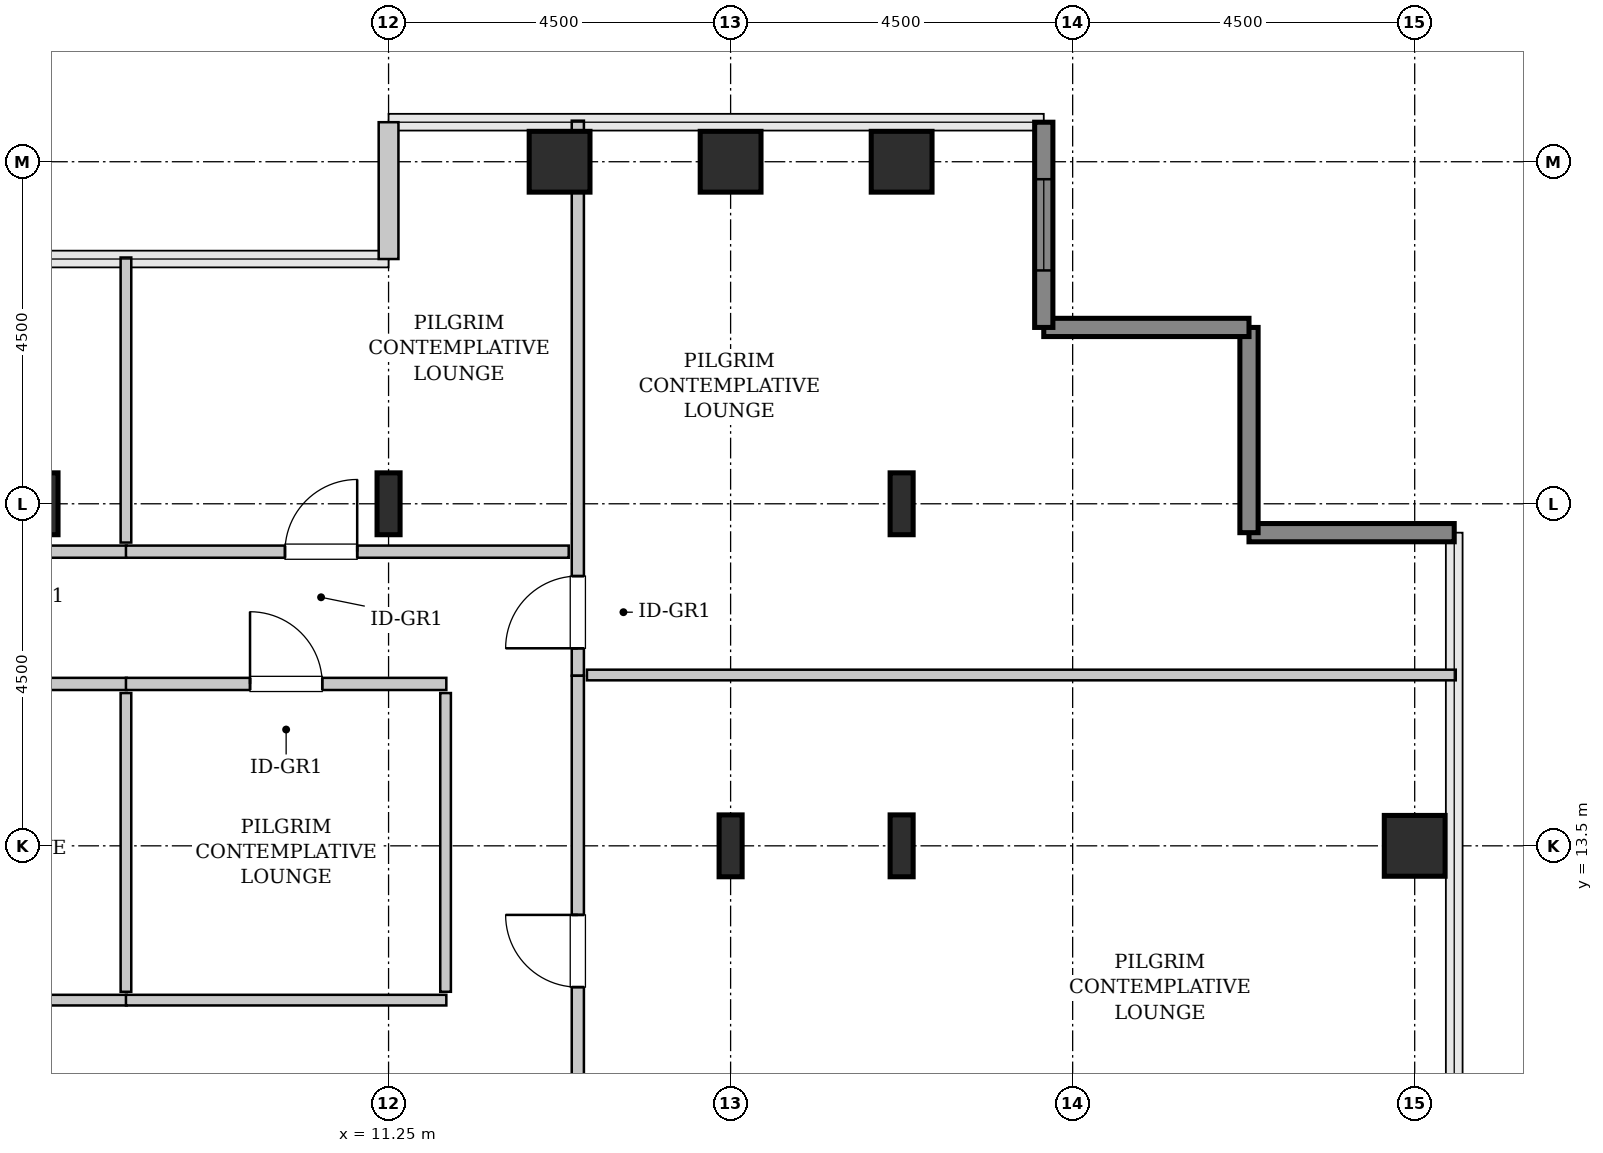
"""IFC4 building model, lengths in metres.
Left out: names, types, materials, properties, quantities, classifications, styles, units other than length and angle.
Written with IfcOpenShell. Run it as: python <this file> out.ifc"""

import sys

from ifc_helpers import new_model, si_unit, direction, frame, frame_2d, origin, origin_2d, place, context, subcontext, project, spatial, rectangle, hollow_rectangle, i_section, extrude, source, transform, mapped, element, fill, save


model = new_model("IFC4")
c1 = context("Model", 3, precision=1e-05, world=origin(), true_north=direction((0.0, 1.0)))
c2 = subcontext(c1, "Body", "Model", "MODEL_VIEW")
j1 = project(units=[si_unit("LENGTHUNIT", "METRE"), si_unit("PLANEANGLEUNIT", "RADIAN")], contexts=[c1])
p1 = place(None, origin())
s1 = spatial("IfcSite", under=j1, at=p1, CompositionType="ELEMENT")
p2 = place(p1, origin())
s2 = spatial("IfcBuilding", under=s1, at=p2, CompositionType="ELEMENT")
p3 = place(p2, frame((0.0, 0.0, 175.4)))
s3 = spatial("IfcBuildingStorey", under=s2, at=p3, CompositionType="ELEMENT", Elevation=175.4)
m1 = source(origin(), c2, "Body", "SweptSolid", [
    extrude(i_section(OverallWidth=0.303, OverallDepth=0.814, WebThickness=0.021, FlangeThickness=0.04, FilletRadius=0.03, at=origin_2d()), origin(), (0.0, 0.0, 1.0), 3.8),
])
for number, where, z_axis, x_axis in (
    (1, (6.75, 18.0, 0.0), (0.0, 0.0, 1.0), (1.0, 0.0, 0.0)),
    (2, (11.25, 18.0, 0.0), (0.0, 0.0, 1.0), (1.0, 0.0, 0.0)),
):
    element("IfcColumn", number, at=place(p3, frame(where, z_axis=z_axis, x_axis=x_axis)), inside=s3, PredefinedType="COLUMN", context=c2, shape_type="MappedRepresentation", body=[
        mapped(m1, transform((0.0, 0.0, 0.0), x_axis=(1.0, 0.0, 0.0), y_axis=(0.0, 1.0, 0.0), z_axis=(0.0, 0.0, 1.0), scale=1.0)),
    ])
m2 = source(origin(), c2, "Body", "SweptSolid", [
    extrude(hollow_rectangle(XDim=0.8, YDim=0.8, WallThickness=0.04, InnerFilletRadius=0.04, OuterFilletRadius=0.08, at=origin_2d()), origin(), (0.0, 0.0, 1.0), 3.8),
])
p4 = place(p3, frame((13.5, 22.5, 0.0), z_axis=(0.0, 0.0, 1.0), x_axis=(1.0, 0.0, 0.0)))
e3 = element("IfcColumn", 3, at=p4, inside=s3, PredefinedType="COLUMN", context=c2, shape_type="MappedRepresentation", body=[
    mapped(m2, transform((0.0, 0.0, 0.0), x_axis=(1.0, 0.0, 0.0), y_axis=(0.0, 1.0, 0.0), z_axis=(0.0, 0.0, 1.0), scale=1.0)),
])
p5 = place(p3, frame((15.75, 13.5, 0.0), z_axis=(0.0, 0.0, 1.0), x_axis=(1.0, 0.0, 0.0)))
e4 = element("IfcColumn", 4, at=p5, inside=s3, PredefinedType="COLUMN", context=c2, shape_type="MappedRepresentation", body=[
    mapped(m1, transform((0.0, 0.0, 0.0), x_axis=(1.0, 0.0, 0.0), y_axis=(0.0, 1.0, 0.0), z_axis=(0.0, 0.0, 1.0), scale=1.0)),
])
p6 = place(p3, frame((15.75, 22.5, 0.0), z_axis=(0.0, 0.0, 1.0), x_axis=(1.0, 0.0, 0.0)))
e5 = element("IfcColumn", 5, at=p6, inside=s3, PredefinedType="COLUMN", context=c2, shape_type="MappedRepresentation", body=[
    mapped(m2, transform((0.0, 0.0, 0.0), x_axis=(1.0, 0.0, 0.0), y_axis=(0.0, 1.0, 0.0), z_axis=(0.0, 0.0, 1.0), scale=1.0)),
])
for number, where, z_axis, x_axis in (
    (6, (18.0, 13.5, 0.0), (0.0, 0.0, 1.0), (1.0, 0.0, 0.0)),
    (7, (18.0, 18.0, 0.0), (0.0, 0.0, 1.0), (1.0, 0.0, 0.0)),
):
    element("IfcColumn", number, at=place(p3, frame(where, z_axis=z_axis, x_axis=x_axis)), inside=s3, PredefinedType="COLUMN", context=c2, shape_type="MappedRepresentation", body=[
        mapped(m1, transform((0.0, 0.0, 0.0), x_axis=(1.0, 0.0, 0.0), y_axis=(0.0, 1.0, 0.0), z_axis=(0.0, 0.0, 1.0), scale=1.0)),
    ])
for number, where, z_axis, x_axis in (
    (8, (18.0, 22.5, 0.0), (0.0, 0.0, 1.0), (1.0, 0.0, 0.0)),
    (9, (24.75, 13.5, 0.0), (0.0, 0.0, 1.0), (1.0, 0.0, 0.0)),
):
    element("IfcColumn", number, at=place(p3, frame(where, z_axis=z_axis, x_axis=x_axis)), inside=s3, PredefinedType="COLUMN", context=c2, shape_type="MappedRepresentation", body=[
        mapped(m2, transform((0.0, 0.0, 0.0), x_axis=(1.0, 0.0, 0.0), y_axis=(0.0, 1.0, 0.0), z_axis=(0.0, 0.0, 1.0), scale=1.0)),
    ])
m3 = source(origin(), c2, "Body", "SweptSolid", [
    extrude(rectangle(XDim=2.7, YDim=0.24, at=frame_2d((1.35, 0.0))), origin(), (0.0, 0.0, 1.0), 3.55),
])
for number, where, z_axis, x_axis in (
    (10, (25.27, 17.62, 0.0), (0.0, 0.0, 1.0), (-1.0, 0.0, 0.0)),
    (11, (22.57, 17.62, 0.0), (0.0, 0.0, 1.0), (0.0, 1.0, 0.0)),
    (12, (22.57, 20.32, 0.0), (0.0, 0.0, 1.0), (-1.0, 0.0, 0.0)),
):
    element("IfcWall", number, at=place(p3, frame(where, z_axis=z_axis, x_axis=x_axis)), inside=s3, PredefinedType="SHEAR", context=c2, shape_type="MappedRepresentation", body=[
        mapped(m3, transform((0.0, 0.0, 0.0), x_axis=(1.0, 0.0, 0.0), y_axis=(0.0, 1.0, 0.0), z_axis=(0.0, 0.0, 1.0), scale=1.0)),
    ])
p7 = place(p3, frame((19.87, 20.32, 0.0), z_axis=(0.0, 0.0, 1.0), x_axis=(0.0, 1.0, 0.0)))
e13 = element("IfcWall", 13, at=p7, inside=s3, PredefinedType="SHEAR", context=c2, shape_type="MappedRepresentation", body=[
    mapped(m3, transform((0.0, 0.0, 0.0), x_axis=(1.0, 0.0, 0.0), y_axis=(0.0, 1.0, 0.0), z_axis=(0.0, 0.0, 1.0), scale=1.0)),
])
p8 = place(p7, frame((0.75, 0.0, 0.85)))
e14 = element("IfcOpeningElement", 14, at=p8, cuts=e13, PredefinedType="OPENING", context=c2, shape_type="SweptSolid", body=[
    extrude(rectangle(XDim=1.2, YDim=1.8, at=frame_2d((0.6, 0.9))), frame((0.0, 0.13, 0.0), z_axis=(0.0, -1.0, 0.0), x_axis=(1.0, 0.0, 0.0)), (0.0, 0.0, 1.0), 0.26),
])
m4 = source(origin(), c2, "Body", "SweptSolid", [
    extrude(rectangle(XDim=1.8, YDim=0.26, at=frame_2d((0.9, 0.0))), origin(), (0.0, 0.0, 1.0), 3.55),
])
p9 = place(p3, frame((11.25, 23.02, 0.0), z_axis=(0.0, 0.0, 1.0), x_axis=(0.0, -1.0, 0.0)))
e15 = element("IfcWall", 15, at=p9, inside=s3, PredefinedType="SOLIDWALL", context=c2, shape_type="MappedRepresentation", body=[
    mapped(m4, transform((0.0, 0.0, 0.0), x_axis=(1.0, 0.0, 0.0), y_axis=(0.0, 1.0, 0.0), z_axis=(0.0, 0.0, 1.0), scale=1.0)),
])
m5 = source(origin(), c2, "Body", "SweptSolid", [
    extrude(rectangle(XDim=7.302, YDim=0.16, at=frame_2d((3.651, 0.0))), origin(), (0.0, 0.0, 1.0), 3.535),
])
p10 = place(p3, frame((13.74, 15.738, 0.0), z_axis=(0.0, 0.0, 1.0), x_axis=(0.0, 1.0, 0.0)))
e16 = element("IfcWall", 16, at=p10, inside=s3, PredefinedType="PARTITIONING", context=c2, shape_type="MappedRepresentation", body=[
    mapped(m5, transform((0.0, 0.0, 0.0), x_axis=(1.0, 0.0, 0.0), y_axis=(0.0, 1.0, 0.0), z_axis=(0.0, 0.0, 1.0), scale=1.0)),
])
p11 = place(p10, frame((0.361, 0.0, 0.0)))
e17 = element("IfcOpeningElement", 17, at=p11, cuts=e16, PredefinedType="OPENING", context=c2, shape_type="SweptSolid", body=[
    extrude(rectangle(XDim=0.95, YDim=2.1, at=frame_2d((0.475, 1.05))), frame((0.0, 0.09, 0.0), z_axis=(0.0, -1.0, 0.0), x_axis=(1.0, 0.0, 0.0)), (0.0, 0.0, 1.0), 0.18),
])
m6 = source(origin(), c2, "Body", "SweptSolid", [
    extrude(rectangle(XDim=11.43, YDim=0.14, at=frame_2d((5.715, 0.0))), origin(), (0.0, 0.0, 1.0), 3.535),
])
p12 = place(p3, frame((13.86, 15.748, 0.0), z_axis=(0.0, 0.0, 1.0), x_axis=(1.0, 0.0, 0.0)))
e18 = element("IfcWall", 18, at=p12, inside=s3, PredefinedType="PARTITIONING", context=c2, shape_type="MappedRepresentation", body=[
    mapped(m6, transform((0.0, 0.0, 0.0), x_axis=(1.0, 0.0, 0.0), y_axis=(0.0, 1.0, 0.0), z_axis=(0.0, 0.0, 1.0), scale=1.0)),
])
m7 = source(origin(), c2, "Body", "SweptSolid", [
    extrude(rectangle(XDim=7.242, YDim=0.16, at=frame_2d((3.621, 0.0))), origin(), (0.0, 0.0, 1.0), 3.535),
])
p13 = place(p3, frame((13.74, 8.495, 0.0), z_axis=(0.0, 0.0, 1.0), x_axis=(0.0, 1.0, 0.0)))
e19 = element("IfcWall", 19, at=p13, inside=s3, PredefinedType="PARTITIONING", context=c2, shape_type="MappedRepresentation", body=[
    mapped(m7, transform((0.0, 0.0, 0.0), x_axis=(1.0, 0.0, 0.0), y_axis=(0.0, 1.0, 0.0), z_axis=(0.0, 0.0, 1.0), scale=1.0)),
])
p14 = place(p13, frame((3.146, 0.0, 0.0)))
e20 = element("IfcOpeningElement", 20, at=p14, cuts=e19, PredefinedType="OPENING", context=c2, shape_type="SweptSolid", body=[
    extrude(rectangle(XDim=0.95, YDim=2.1, at=frame_2d((0.475, 1.05))), frame((0.0, 0.09, 0.0), z_axis=(0.0, -1.0, 0.0), x_axis=(1.0, 0.0, 0.0)), (0.0, 0.0, 1.0), 0.18),
])
m8 = source(origin(), c2, "Body", "SweptSolid", [
    extrude(rectangle(XDim=6.01, YDim=0.16, at=frame_2d((3.005, 0.0))), origin(), (0.0, 0.0, 1.0), 3.535),
])
p15 = place(p3, frame((1.795, 17.37, 0.0), z_axis=(0.0, 0.0, 1.0), x_axis=(1.0, 0.0, 0.0)))
e21 = element("IfcWall", 21, at=p15, inside=s3, PredefinedType="PARTITIONING", context=c2, shape_type="MappedRepresentation", body=[
    mapped(m8, transform((0.0, 0.0, 0.0), x_axis=(1.0, 0.0, 0.0), y_axis=(0.0, 1.0, 0.0), z_axis=(0.0, 0.0, 1.0), scale=1.0)),
])
p16 = place(p15, frame((2.53, 0.0, 0.0)))
e22 = element("IfcOpeningElement", 22, at=p16, cuts=e21, PredefinedType="OPENING", context=c2, shape_type="SweptSolid", body=[
    extrude(rectangle(XDim=0.95, YDim=2.1, at=frame_2d((0.475, 1.05))), frame((0.0, 0.09, 0.0), z_axis=(0.0, -1.0, 0.0), x_axis=(1.0, 0.0, 0.0)), (0.0, 0.0, 1.0), 0.18),
])
m9 = source(origin(), c2, "Body", "SweptSolid", [
    extrude(rectangle(XDim=3.75, YDim=0.14, at=frame_2d((1.875, 0.0))), origin(), (0.0, 0.0, 1.0), 3.535),
])
p17 = place(p3, frame((7.795, 17.49, 0.0), z_axis=(0.0, 0.0, 1.0), x_axis=(0.0, 1.0, 0.0)))
e23 = element("IfcWall", 23, at=p17, inside=s3, PredefinedType="PARTITIONING", context=c2, shape_type="MappedRepresentation", body=[
    mapped(m9, transform((0.0, 0.0, 0.0), x_axis=(1.0, 0.0, 0.0), y_axis=(0.0, 1.0, 0.0), z_axis=(0.0, 0.0, 1.0), scale=1.0)),
])
p18 = place(p3, frame((1.795, 15.63, 0.0), z_axis=(0.0, 0.0, 1.0), x_axis=(1.0, 0.0, 0.0)))
e24 = element("IfcWall", 24, at=p18, inside=s3, PredefinedType="PARTITIONING", context=c2, shape_type="MappedRepresentation", body=[
    mapped(m8, transform((0.0, 0.0, 0.0), x_axis=(1.0, 0.0, 0.0), y_axis=(0.0, 1.0, 0.0), z_axis=(0.0, 0.0, 1.0), scale=1.0)),
])
p19 = place(p18, frame((2.53, 0.0, 0.0)))
e25 = element("IfcOpeningElement", 25, at=p19, cuts=e24, PredefinedType="OPENING", context=c2, shape_type="SweptSolid", body=[
    extrude(rectangle(XDim=0.95, YDim=2.1, at=frame_2d((0.475, 1.05))), frame((0.0, 0.09, 0.0), z_axis=(0.0, -1.0, 0.0), x_axis=(1.0, 0.0, 0.0)), (0.0, 0.0, 1.0), 0.18),
])
m10 = source(origin(), c2, "Body", "SweptSolid", [
    extrude(rectangle(XDim=6.01, YDim=0.14, at=frame_2d((3.005, 0.0))), origin(), (0.0, 0.0, 1.0), 3.535),
])
p20 = place(p3, frame((1.795, 11.47, 0.0), z_axis=(0.0, 0.0, 1.0), x_axis=(1.0, 0.0, 0.0)))
e26 = element("IfcWall", 26, at=p20, inside=s3, PredefinedType="PARTITIONING", context=c2, shape_type="MappedRepresentation", body=[
    mapped(m10, transform((0.0, 0.0, 0.0), x_axis=(1.0, 0.0, 0.0), y_axis=(0.0, 1.0, 0.0), z_axis=(0.0, 0.0, 1.0), scale=1.0)),
])
m11 = source(origin(), c2, "Body", "SweptSolid", [
    extrude(rectangle(XDim=3.93, YDim=0.14, at=frame_2d((1.965, 0.0))), origin(), (0.0, 0.0, 1.0), 3.535),
])
p21 = place(p3, frame((7.795, 11.58, 0.0), z_axis=(0.0, 0.0, 1.0), x_axis=(0.0, 1.0, 0.0)))
e27 = element("IfcWall", 27, at=p21, inside=s3, PredefinedType="PARTITIONING", context=c2, shape_type="MappedRepresentation", body=[
    mapped(m11, transform((0.0, 0.0, 0.0), x_axis=(1.0, 0.0, 0.0), y_axis=(0.0, 1.0, 0.0), z_axis=(0.0, 0.0, 1.0), scale=1.0)),
])
m12 = source(origin(), c2, "Body", "SweptSolid", [
    extrude(rectangle(XDim=5.825, YDim=0.16, at=frame_2d((2.913, 0.0))), origin(), (0.0, 0.0, 1.0), 3.535),
])
p22 = place(p3, frame((7.795, 17.37, 0.0), z_axis=(0.0, 0.0, 1.0), x_axis=(1.0, 0.0, 0.0)))
e28 = element("IfcWall", 28, at=p22, inside=s3, PredefinedType="PARTITIONING", context=c2, shape_type="MappedRepresentation", body=[
    mapped(m12, transform((0.0, 0.0, 0.0), x_axis=(1.0, 0.0, 0.0), y_axis=(0.0, 1.0, 0.0), z_axis=(0.0, 0.0, 1.0), scale=1.0)),
])
p23 = place(p22, frame((2.092, 0.0, 0.0)))
e29 = element("IfcOpeningElement", 29, at=p23, cuts=e28, PredefinedType="OPENING", context=c2, shape_type="SweptSolid", body=[
    extrude(rectangle(XDim=0.95, YDim=2.1, at=frame_2d((0.475, 1.05))), frame((0.0, 0.09, 0.0), z_axis=(0.0, -1.0, 0.0), x_axis=(1.0, 0.0, 0.0)), (0.0, 0.0, 1.0), 0.18),
])
m13 = source(origin(), c2, "Body", "SweptSolid", [
    extrude(rectangle(XDim=4.215, YDim=0.16, at=frame_2d((2.107, 0.0))), origin(), (0.0, 0.0, 1.0), 3.535),
])
p24 = place(p3, frame((7.795, 15.63, 0.0), z_axis=(0.0, 0.0, 1.0), x_axis=(1.0, 0.0, 0.0)))
e30 = element("IfcWall", 30, at=p24, inside=s3, PredefinedType="PARTITIONING", context=c2, shape_type="MappedRepresentation", body=[
    mapped(m13, transform((0.0, 0.0, 0.0), x_axis=(1.0, 0.0, 0.0), y_axis=(0.0, 1.0, 0.0), z_axis=(0.0, 0.0, 1.0), scale=1.0)),
])
p25 = place(p24, frame((1.633, 0.0, 0.0)))
e31 = element("IfcOpeningElement", 31, at=p25, cuts=e30, PredefinedType="OPENING", context=c2, shape_type="SweptSolid", body=[
    extrude(rectangle(XDim=0.95, YDim=2.1, at=frame_2d((0.475, 1.05))), frame((0.0, 0.09, 0.0), z_axis=(0.0, -1.0, 0.0), x_axis=(1.0, 0.0, 0.0)), (0.0, 0.0, 1.0), 0.18),
])
m14 = source(origin(), c2, "Body", "SweptSolid", [
    extrude(rectangle(XDim=4.215, YDim=0.14, at=frame_2d((2.107, 0.0))), origin(), (0.0, 0.0, 1.0), 3.535),
])
p26 = place(p3, frame((7.795, 11.47, 0.0), z_axis=(0.0, 0.0, 1.0), x_axis=(1.0, 0.0, 0.0)))
e32 = element("IfcWall", 32, at=p26, inside=s3, PredefinedType="PARTITIONING", context=c2, shape_type="MappedRepresentation", body=[
    mapped(m14, transform((0.0, 0.0, 0.0), x_axis=(1.0, 0.0, 0.0), y_axis=(0.0, 1.0, 0.0), z_axis=(0.0, 0.0, 1.0), scale=1.0)),
])
p27 = place(p3, frame((12.0, 11.58, 0.0), z_axis=(0.0, 0.0, 1.0), x_axis=(0.0, 1.0, 0.0)))
e33 = element("IfcWall", 33, at=p27, inside=s3, PredefinedType="PARTITIONING", context=c2, shape_type="MappedRepresentation", body=[
    mapped(m11, transform((0.0, 0.0, 0.0), x_axis=(1.0, 0.0, 0.0), y_axis=(0.0, 1.0, 0.0), z_axis=(0.0, 0.0, 1.0), scale=1.0)),
])
m15 = source(origin(), c2, "Body", "SweptSolid", [
    extrude(rectangle(XDim=1.2, YDim=1.8, at=frame_2d((0.6, 0.9))), frame((0.0, 0.03, 0.0), z_axis=(0.0, -1.0, 0.0), x_axis=(1.0, 0.0, 0.0)), (0.0, 0.0, 1.0), 0.06),
])
p28 = place(p8, origin())
e34 = element("IfcWindow", 34, at=p28, inside=s3, PartitioningType="SINGLE_PANEL", PredefinedType="WINDOW", context=c2, shape_type="MappedRepresentation", body=[
    mapped(m15, transform((0.0, 0.0, 0.0), x_axis=(1.0, 0.0, 0.0), y_axis=(0.0, 1.0, 0.0), z_axis=(0.0, 0.0, 1.0), scale=1.0)),
])
fill(e14, e34)
m16 = source(origin(), c2, "Body", "SweptSolid", [
    extrude(rectangle(XDim=0.95, YDim=2.1, at=frame_2d((0.475, 1.05))), frame((0.0, 0.025, 0.0), z_axis=(0.0, -1.0, 0.0), x_axis=(1.0, 0.0, 0.0)), (0.0, 0.0, 1.0), 0.05),
])
p29 = place(p11, origin())
e35 = element("IfcDoor", 35, at=p29, inside=s3, OperationType="SINGLE_SWING_LEFT", PredefinedType="DOOR", context=c2, shape_type="MappedRepresentation", body=[
    mapped(m16, transform((0.0, 0.0, 0.0), x_axis=(1.0, 0.0, 0.0), y_axis=(0.0, 1.0, 0.0), z_axis=(0.0, 0.0, 1.0), scale=1.0)),
])
fill(e17, e35)
p30 = place(p14, origin())
e36 = element("IfcDoor", 36, at=p30, inside=s3, OperationType="SINGLE_SWING_RIGHT", PredefinedType="DOOR", context=c2, shape_type="MappedRepresentation", body=[
    mapped(m16, transform((0.0, 0.0, 0.0), x_axis=(1.0, 0.0, 0.0), y_axis=(0.0, 1.0, 0.0), z_axis=(0.0, 0.0, 1.0), scale=1.0)),
])
fill(e20, e36)
p31 = place(p23, origin())
e37 = element("IfcDoor", 37, at=p31, inside=s3, OperationType="SINGLE_SWING_RIGHT", PredefinedType="DOOR", context=c2, shape_type="MappedRepresentation", body=[
    mapped(m16, transform((0.0, 0.0, 0.0), x_axis=(1.0, 0.0, 0.0), y_axis=(0.0, 1.0, 0.0), z_axis=(0.0, 0.0, 1.0), scale=1.0)),
])
fill(e29, e37)
p32 = place(p25, origin())
e38 = element("IfcDoor", 38, at=p32, inside=s3, OperationType="SINGLE_SWING_LEFT", PredefinedType="DOOR", context=c2, shape_type="MappedRepresentation", body=[
    mapped(m16, transform((0.0, 0.0, 0.0), x_axis=(1.0, 0.0, 0.0), y_axis=(0.0, 1.0, 0.0), z_axis=(0.0, 0.0, 1.0), scale=1.0)),
])
fill(e31, e38)
save(model, sys.argv[1])
